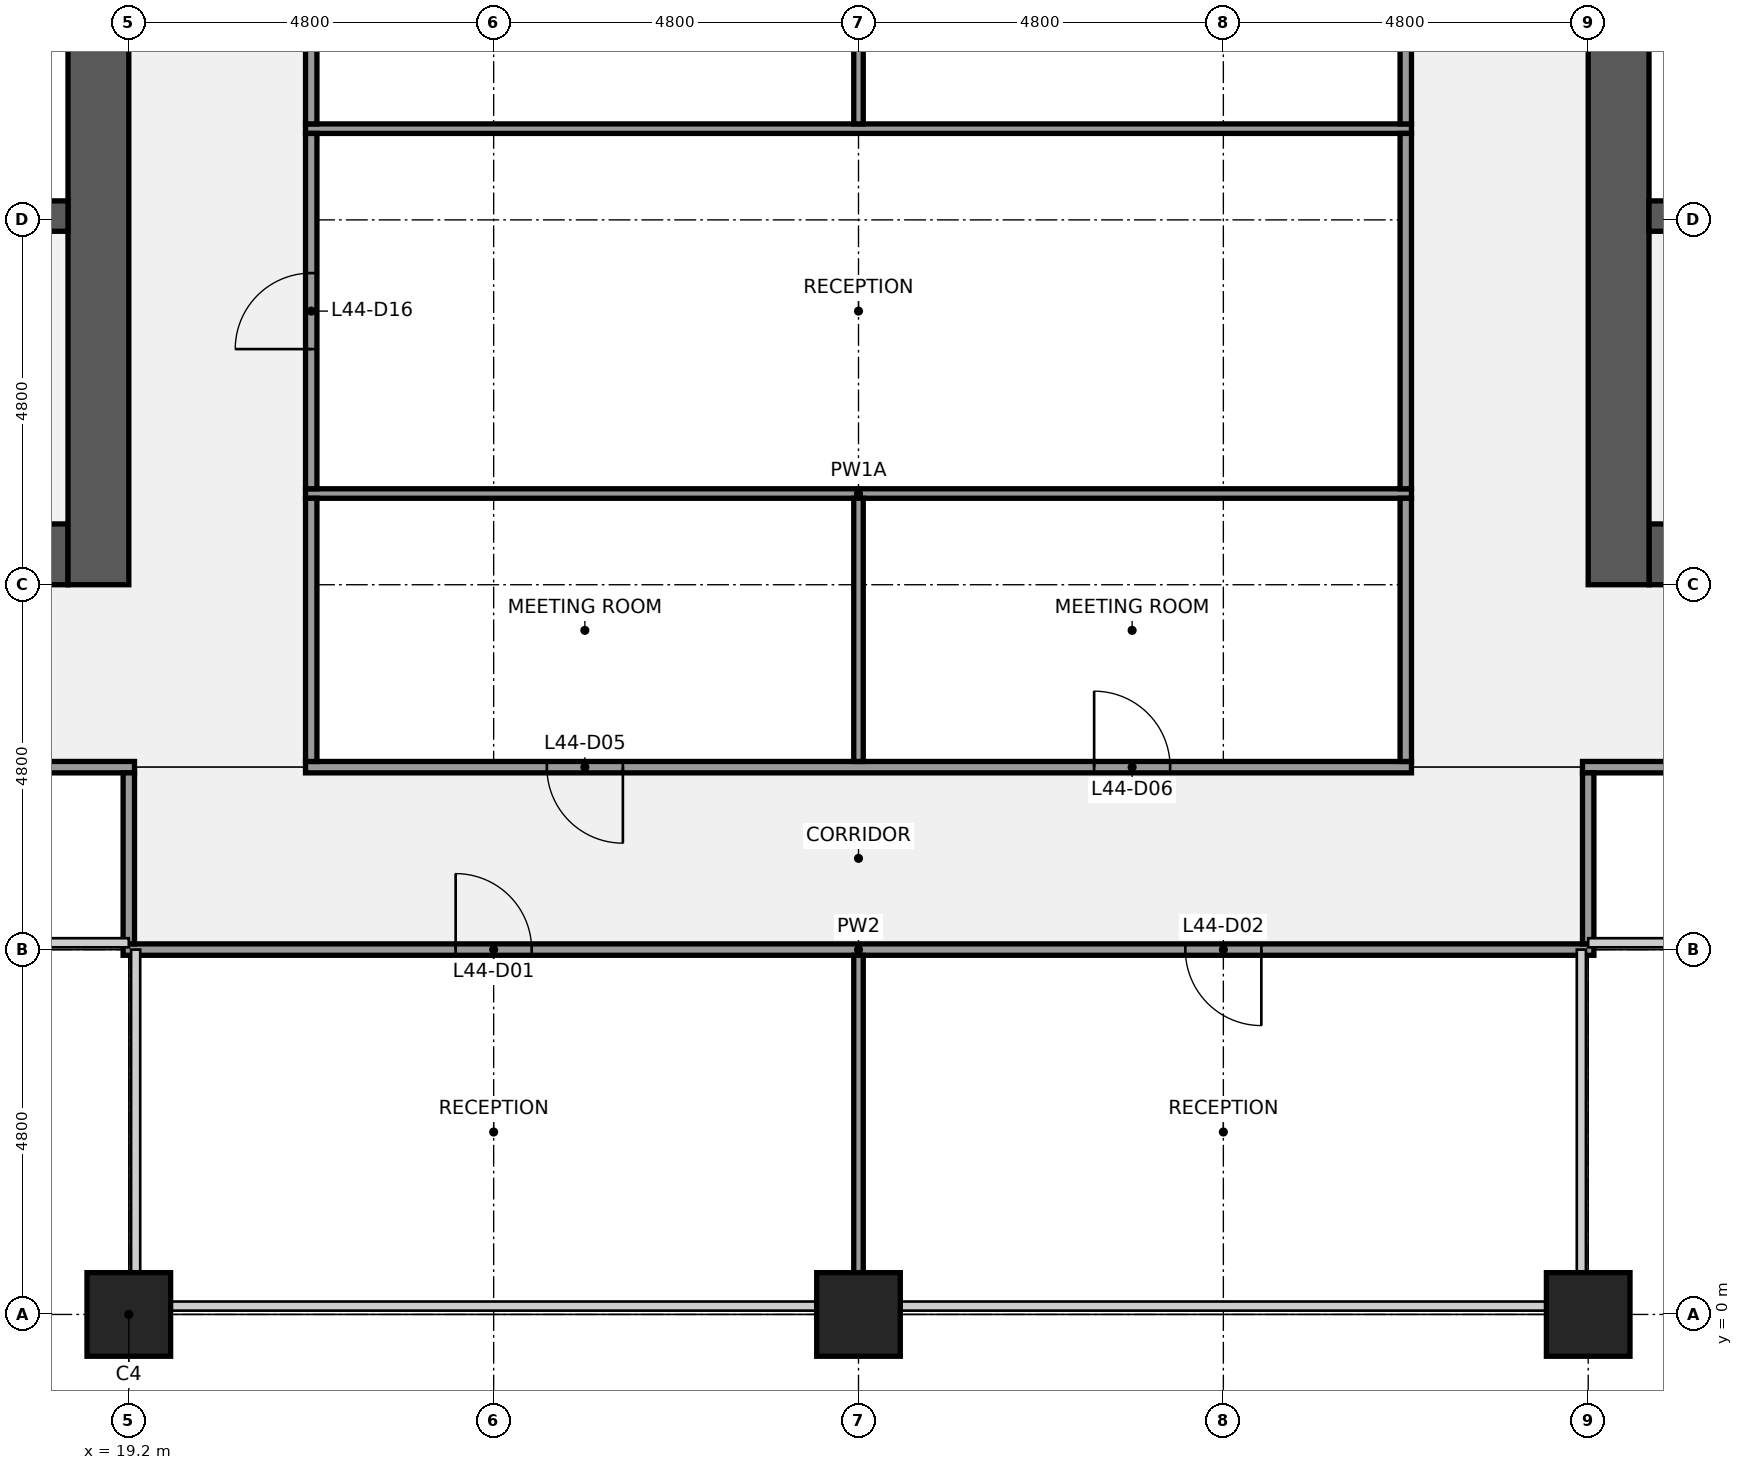
"""IFC4 building model, lengths in metres.
Left out: names, types, materials, properties, quantities, classifications, styles, units other than length and angle.
Written with IfcOpenShell. Run it as: python <this file> out.ifc"""

import sys

from ifc_helpers import new_model, si_unit, direction, frame, frame_2d, origin, origin_2d, place, context, subcontext, project, spatial, rectangle, extrude, element, fill, save


model = new_model("IFC4")
c1 = context("Model", 3, precision=1e-05, world=origin(), true_north=direction((0.0, 1.0)))
c2 = subcontext(c1, "Body", "Model", "MODEL_VIEW")
j1 = project(units=[si_unit("LENGTHUNIT", "METRE"), si_unit("PLANEANGLEUNIT", "RADIAN")], contexts=[c1])
p1 = place(None, origin())
s1 = spatial("IfcSite", under=j1, at=p1, CompositionType="ELEMENT")
p2 = place(p1, origin())
s2 = spatial("IfcBuilding", under=s1, at=p2, CompositionType="ELEMENT")
p3 = place(p2, frame((0.0, 0.0, 205.2)))
s3 = spatial("IfcBuildingStorey", under=s2, at=p3, CompositionType="ELEMENT", Elevation=205.2)
for number, where, z_axis, x_axis in (
    (1, (19.2, 0.0, 0.0), (0.0, 0.0, 1.0), (1.0, 0.0, 0.0)),
    (2, (28.8, 0.0, 0.0), (0.0, 0.0, 1.0), (1.0, 0.0, 0.0)),
    (3, (38.4, 0.0, 0.0), (0.0, 0.0, 1.0), (1.0, 0.0, 0.0)),
):
    element("IfcColumn", number, at=place(p3, frame(where, z_axis=z_axis, x_axis=x_axis)), inside=s3, PredefinedType="COLUMN", context=c2, shape_type="SweptSolid", body=[
        extrude(rectangle(XDim=1.1, YDim=1.1, at=origin_2d()), origin(), (0.0, 0.0, 1.0), 4.0),
    ])
p4 = place(p3, frame((18.4, 10.0, 0.0), z_axis=(0.0, 0.0, 1.0), x_axis=(-1.0, 0.0, 0.0)))
e4 = element("IfcWall", 4, at=p4, inside=s3, PredefinedType="SHEAR", context=c2, shape_type="SweptSolid", body=[
    extrude(rectangle(XDim=8.8, YDim=0.8, at=frame_2d((4.4, 0.0))), origin(), (0.0, 0.0, 1.0), 3.84),
])
p5 = place(p4, frame((1.05, 0.0, 0.0)))
e5 = element("IfcOpeningElement", 5, at=p5, cuts=e4, PredefinedType="OPENING", context=c2, shape_type="SweptSolid", body=[
    extrude(rectangle(XDim=1.1, YDim=2.1, at=frame_2d((0.55, 1.05))), frame((0.0, 0.41, 0.0), z_axis=(0.0, -1.0, 0.0), x_axis=(1.0, 0.0, 0.0)), (0.0, 0.0, 1.0), 0.82),
])
p6 = place(p3, frame((18.8, 38.4, 0.0), z_axis=(0.0, 0.0, 1.0), x_axis=(0.0, -1.0, 0.0)))
e6 = element("IfcWall", 6, at=p6, inside=s3, PredefinedType="SHEAR", context=c2, shape_type="SweptSolid", body=[
    extrude(rectangle(XDim=28.8, YDim=0.8, at=frame_2d((14.4, 0.0))), origin(), (0.0, 0.0, 1.0), 3.84),
])
p7 = place(p6, frame((18.3, 0.0, 0.0)))
e7 = element("IfcOpeningElement", 7, at=p7, cuts=e6, PredefinedType="OPENING", context=c2, shape_type="SweptSolid", body=[
    extrude(rectangle(XDim=1.8, YDim=2.1, at=frame_2d((0.9, 1.05))), frame((0.0, 0.41, 0.0), z_axis=(0.0, -1.0, 0.0), x_axis=(1.0, 0.0, 0.0)), (0.0, 0.0, 1.0), 0.82),
])
p8 = place(p6, frame((8.7, 0.0, 0.0)))
e8 = element("IfcOpeningElement", 8, at=p8, cuts=e6, PredefinedType="OPENING", context=c2, shape_type="SweptSolid", body=[
    extrude(rectangle(XDim=1.8, YDim=2.1, at=frame_2d((0.9, 1.05))), frame((0.0, 0.41, 0.0), z_axis=(0.0, -1.0, 0.0), x_axis=(1.0, 0.0, 0.0)), (0.0, 0.0, 1.0), 0.82),
])
p9 = place(p3, frame((0.8, 14.45, 0.0), z_axis=(0.0, 0.0, 1.0), x_axis=(1.0, 0.0, 0.0)))
e9 = element("IfcWall", 9, at=p9, inside=s3, PredefinedType="SHEAR", context=c2, shape_type="SweptSolid", body=[
    extrude(rectangle(XDim=17.6, YDim=0.4, at=frame_2d((8.8, 0.0))), origin(), (0.0, 0.0, 1.0), 3.84),
])
p10 = place(p3, frame((48.0, 10.0, 0.0), z_axis=(0.0, 0.0, 1.0), x_axis=(-1.0, 0.0, 0.0)))
e10 = element("IfcWall", 10, at=p10, inside=s3, PredefinedType="SHEAR", context=c2, shape_type="SweptSolid", body=[
    extrude(rectangle(XDim=8.8, YDim=0.8, at=frame_2d((4.4, 0.0))), origin(), (0.0, 0.0, 1.0), 3.84),
])
p11 = place(p10, frame((6.65, 0.0, 0.0)))
e11 = element("IfcOpeningElement", 11, at=p11, cuts=e10, PredefinedType="OPENING", context=c2, shape_type="SweptSolid", body=[
    extrude(rectangle(XDim=1.1, YDim=2.1, at=frame_2d((0.55, 1.05))), frame((0.0, 0.41, 0.0), z_axis=(0.0, -1.0, 0.0), x_axis=(1.0, 0.0, 0.0)), (0.0, 0.0, 1.0), 0.82),
])
p12 = place(p3, frame((38.8, 9.6, 0.0), z_axis=(0.0, 0.0, 1.0), x_axis=(0.0, 1.0, 0.0)))
e12 = element("IfcWall", 12, at=p12, inside=s3, PredefinedType="SHEAR", context=c2, shape_type="SweptSolid", body=[
    extrude(rectangle(XDim=28.8, YDim=0.8, at=frame_2d((14.4, 0.0))), origin(), (0.0, 0.0, 1.0), 3.84),
])
p13 = place(p12, frame((8.7, 0.0, 0.0)))
e13 = element("IfcOpeningElement", 13, at=p13, cuts=e12, PredefinedType="OPENING", context=c2, shape_type="SweptSolid", body=[
    extrude(rectangle(XDim=1.8, YDim=2.1, at=frame_2d((0.9, 1.05))), frame((0.0, 0.41, 0.0), z_axis=(0.0, -1.0, 0.0), x_axis=(1.0, 0.0, 0.0)), (0.0, 0.0, 1.0), 0.82),
])
p14 = place(p12, frame((18.3, 0.0, 0.0)))
e14 = element("IfcOpeningElement", 14, at=p14, cuts=e12, PredefinedType="OPENING", context=c2, shape_type="SweptSolid", body=[
    extrude(rectangle(XDim=1.8, YDim=2.1, at=frame_2d((0.9, 1.05))), frame((0.0, 0.41, 0.0), z_axis=(0.0, -1.0, 0.0), x_axis=(1.0, 0.0, 0.0)), (0.0, 0.0, 1.0), 0.82),
])
p15 = place(p3, frame((39.2, 14.45, 0.0), z_axis=(0.0, 0.0, 1.0), x_axis=(1.0, 0.0, 0.0)))
e15 = element("IfcWall", 15, at=p15, inside=s3, PredefinedType="SHEAR", context=c2, shape_type="SweptSolid", body=[
    extrude(rectangle(XDim=17.6, YDim=0.4, at=frame_2d((8.8, 0.0))), origin(), (0.0, 0.0, 1.0), 3.84),
])
p16 = place(p3, frame((19.125, 4.8, 0.0), z_axis=(0.0, 0.0, 1.0), x_axis=(1.0, 0.0, 0.0)))
e16 = element("IfcWall", 16, at=p16, inside=s3, PredefinedType="PARTITIONING", context=c2, shape_type="SweptSolid", body=[
    extrude(rectangle(XDim=19.35, YDim=0.15, at=frame_2d((9.675, 0.0))), origin(), (0.0, 0.0, 1.0), 2.849),
])
p17 = place(p16, frame((4.375, 0.0, 0.0)))
e17 = element("IfcOpeningElement", 17, at=p17, cuts=e16, PredefinedType="OPENING", context=c2, shape_type="SweptSolid", body=[
    extrude(rectangle(XDim=1.0, YDim=2.1, at=frame_2d((0.5, 1.05))), frame((0.0, 0.085, 0.0), z_axis=(0.0, -1.0, 0.0), x_axis=(1.0, 0.0, 0.0)), (0.0, 0.0, 1.0), 0.17),
])
p18 = place(p16, frame((13.975, 0.0, 0.0)))
e18 = element("IfcOpeningElement", 18, at=p18, cuts=e16, PredefinedType="OPENING", context=c2, shape_type="SweptSolid", body=[
    extrude(rectangle(XDim=1.0, YDim=2.1, at=frame_2d((0.5, 1.05))), frame((0.0, 0.085, 0.0), z_axis=(0.0, -1.0, 0.0), x_axis=(1.0, 0.0, 0.0)), (0.0, 0.0, 1.0), 0.17),
])
p19 = place(p3, frame((9.7, 7.2, 0.0), z_axis=(0.0, 0.0, 1.0), x_axis=(1.0, 0.0, 0.0)))
e19 = element("IfcWall", 19, at=p19, inside=s3, PredefinedType="PARTITIONING", context=c2, shape_type="SweptSolid", body=[
    extrude(rectangle(XDim=9.575, YDim=0.15, at=frame_2d((4.788, 0.0))), origin(), (0.0, 0.0, 1.0), 2.849),
])
p20 = place(p19, frame((1.85, 0.0, 0.0)))
e20 = element("IfcOpeningElement", 20, at=p20, cuts=e19, PredefinedType="OPENING", context=c2, shape_type="SweptSolid", body=[
    extrude(rectangle(XDim=1.0, YDim=2.1, at=frame_2d((0.5, 1.05))), frame((0.0, 0.085, 0.0), z_axis=(0.0, -1.0, 0.0), x_axis=(1.0, 0.0, 0.0)), (0.0, 0.0, 1.0), 0.17),
])
p21 = place(p19, frame((6.6, 0.0, 0.0)))
e21 = element("IfcOpeningElement", 21, at=p21, cuts=e19, PredefinedType="OPENING", context=c2, shape_type="SweptSolid", body=[
    extrude(rectangle(XDim=1.0, YDim=2.1, at=frame_2d((0.5, 1.05))), frame((0.0, 0.085, 0.0), z_axis=(0.0, -1.0, 0.0), x_axis=(1.0, 0.0, 0.0)), (0.0, 0.0, 1.0), 0.17),
])
p22 = place(p3, frame((21.525, 7.2, 0.0), z_axis=(0.0, 0.0, 1.0), x_axis=(1.0, 0.0, 0.0)))
e22 = element("IfcWall", 22, at=p22, inside=s3, PredefinedType="PARTITIONING", context=c2, shape_type="SweptSolid", body=[
    extrude(rectangle(XDim=14.55, YDim=0.15, at=frame_2d((7.275, 0.0))), origin(), (0.0, 0.0, 1.0), 2.849),
])
p23 = place(p22, frame((3.175, 0.0, 0.0)))
e23 = element("IfcOpeningElement", 23, at=p23, cuts=e22, PredefinedType="OPENING", context=c2, shape_type="SweptSolid", body=[
    extrude(rectangle(XDim=1.0, YDim=2.1, at=frame_2d((0.5, 1.05))), frame((0.0, 0.085, 0.0), z_axis=(0.0, -1.0, 0.0), x_axis=(1.0, 0.0, 0.0)), (0.0, 0.0, 1.0), 0.17),
])
p24 = place(p22, frame((10.375, 0.0, 0.0)))
e24 = element("IfcOpeningElement", 24, at=p24, cuts=e22, PredefinedType="OPENING", context=c2, shape_type="SweptSolid", body=[
    extrude(rectangle(XDim=1.0, YDim=2.1, at=frame_2d((0.5, 1.05))), frame((0.0, 0.085, 0.0), z_axis=(0.0, -1.0, 0.0), x_axis=(1.0, 0.0, 0.0)), (0.0, 0.0, 1.0), 0.17),
])
p25 = place(p3, frame((38.325, 7.2, 0.0), z_axis=(0.0, 0.0, 1.0), x_axis=(1.0, 0.0, 0.0)))
e25 = element("IfcWall", 25, at=p25, inside=s3, PredefinedType="PARTITIONING", context=c2, shape_type="SweptSolid", body=[
    extrude(rectangle(XDim=9.575, YDim=0.15, at=frame_2d((4.788, 0.0))), origin(), (0.0, 0.0, 1.0), 2.849),
])
p26 = place(p25, frame((4.325, 0.0, 0.0)))
e26 = element("IfcOpeningElement", 26, at=p26, cuts=e25, PredefinedType="OPENING", context=c2, shape_type="SweptSolid", body=[
    extrude(rectangle(XDim=1.0, YDim=2.1, at=frame_2d((0.5, 1.05))), frame((0.0, 0.085, 0.0), z_axis=(0.0, -1.0, 0.0), x_axis=(1.0, 0.0, 0.0)), (0.0, 0.0, 1.0), 0.17),
])
for number, where, z_axis, x_axis in (
    (27, (21.525, 10.8, 0.0), (0.0, 0.0, 1.0), (1.0, 0.0, 0.0)),
    (28, (21.525, 15.6, 0.0), (0.0, 0.0, 1.0), (1.0, 0.0, 0.0)),
):
    element("IfcWall", number, at=place(p3, frame(where, z_axis=z_axis, x_axis=x_axis)), inside=s3, PredefinedType="PARTITIONING", context=c2, shape_type="SweptSolid", body=[
        extrude(rectangle(XDim=14.55, YDim=0.125, at=frame_2d((7.275, 0.0))), origin(), (0.0, 0.0, 1.0), 2.849),
    ])
p27 = place(p3, frame((19.2, 4.875, 0.0), z_axis=(0.0, 0.0, 1.0), x_axis=(0.0, 1.0, 0.0)))
e29 = element("IfcWall", 29, at=p27, inside=s3, PredefinedType="PARTITIONING", context=c2, shape_type="SweptSolid", body=[
    extrude(rectangle(XDim=2.25, YDim=0.15, at=frame_2d((1.125, 0.0))), origin(), (0.0, 0.0, 1.0), 2.849),
])
p28 = place(p3, frame((21.6, 7.275, 0.0), z_axis=(0.0, 0.0, 1.0), x_axis=(0.0, 1.0, 0.0)))
e30 = element("IfcWall", 30, at=p28, inside=s3, PredefinedType="PARTITIONING", context=c2, shape_type="SweptSolid", body=[
    extrude(rectangle(XDim=3.463, YDim=0.15, at=frame_2d((1.731, 0.0))), origin(), (0.0, 0.0, 1.0), 2.849),
])
p29 = place(p3, frame((21.6, 10.863, 0.0), z_axis=(0.0, 0.0, 1.0), x_axis=(0.0, 1.0, 0.0)))
e31 = element("IfcWall", 31, at=p29, inside=s3, PredefinedType="PARTITIONING", context=c2, shape_type="SweptSolid", body=[
    extrude(rectangle(XDim=4.675, YDim=0.15, at=frame_2d((2.337, 0.0))), origin(), (0.0, 0.0, 1.0), 2.849),
])
p30 = place(p29, frame((1.837, 0.0, 0.0)))
e32 = element("IfcOpeningElement", 32, at=p30, cuts=e31, PredefinedType="OPENING", context=c2, shape_type="SweptSolid", body=[
    extrude(rectangle(XDim=1.0, YDim=2.1, at=frame_2d((0.5, 1.05))), frame((0.0, 0.085, 0.0), z_axis=(0.0, -1.0, 0.0), x_axis=(1.0, 0.0, 0.0)), (0.0, 0.0, 1.0), 0.17),
])
p31 = place(p3, frame((21.6, 15.663, 0.0), z_axis=(0.0, 0.0, 1.0), x_axis=(0.0, 1.0, 0.0)))
e33 = element("IfcWall", 33, at=p31, inside=s3, PredefinedType="PARTITIONING", context=c2, shape_type="SweptSolid", body=[
    extrude(rectangle(XDim=9.475, YDim=0.15, at=frame_2d((4.737, 0.0))), origin(), (0.0, 0.0, 1.0), 2.849),
])
p32 = place(p31, frame((4.238, 0.0, 0.0)))
e34 = element("IfcOpeningElement", 34, at=p32, cuts=e33, PredefinedType="OPENING", context=c2, shape_type="SweptSolid", body=[
    extrude(rectangle(XDim=1.0, YDim=2.1, at=frame_2d((0.5, 1.05))), frame((0.0, 0.085, 0.0), z_axis=(0.0, -1.0, 0.0), x_axis=(1.0, 0.0, 0.0)), (0.0, 0.0, 1.0), 0.17),
])
p33 = place(p3, frame((28.8, 0.55, 0.0), z_axis=(0.0, 0.0, 1.0), x_axis=(0.0, 1.0, 0.0)))
e35 = element("IfcWall", 35, at=p33, inside=s3, PredefinedType="PARTITIONING", context=c2, shape_type="SweptSolid", body=[
    extrude(rectangle(XDim=4.175, YDim=0.125, at=frame_2d((2.087, 0.0))), origin(), (0.0, 0.0, 1.0), 2.849),
])
p34 = place(p3, frame((28.8, 7.275, 0.0), z_axis=(0.0, 0.0, 1.0), x_axis=(0.0, 1.0, 0.0)))
e36 = element("IfcWall", 36, at=p34, inside=s3, PredefinedType="PARTITIONING", context=c2, shape_type="SweptSolid", body=[
    extrude(rectangle(XDim=3.463, YDim=0.125, at=frame_2d((1.731, 0.0))), origin(), (0.0, 0.0, 1.0), 2.849),
])
p35 = place(p3, frame((28.8, 15.663, 0.0), z_axis=(0.0, 0.0, 1.0), x_axis=(0.0, 1.0, 0.0)))
e37 = element("IfcWall", 37, at=p35, inside=s3, PredefinedType="PARTITIONING", context=c2, shape_type="SweptSolid", body=[
    extrude(rectangle(XDim=9.475, YDim=0.125, at=frame_2d((4.737, 0.0))), origin(), (0.0, 0.0, 1.0), 2.849),
])
p36 = place(p3, frame((36.0, 7.275, 0.0), z_axis=(0.0, 0.0, 1.0), x_axis=(0.0, 1.0, 0.0)))
e38 = element("IfcWall", 38, at=p36, inside=s3, PredefinedType="PARTITIONING", context=c2, shape_type="SweptSolid", body=[
    extrude(rectangle(XDim=3.463, YDim=0.15, at=frame_2d((1.731, 0.0))), origin(), (0.0, 0.0, 1.0), 2.849),
])
p37 = place(p3, frame((36.0, 10.863, 0.0), z_axis=(0.0, 0.0, 1.0), x_axis=(0.0, 1.0, 0.0)))
e39 = element("IfcWall", 39, at=p37, inside=s3, PredefinedType="PARTITIONING", context=c2, shape_type="SweptSolid", body=[
    extrude(rectangle(XDim=4.675, YDim=0.15, at=frame_2d((2.337, 0.0))), origin(), (0.0, 0.0, 1.0), 2.849),
])
p38 = place(p3, frame((36.0, 15.663, 0.0), z_axis=(0.0, 0.0, 1.0), x_axis=(0.0, 1.0, 0.0)))
e40 = element("IfcWall", 40, at=p38, inside=s3, PredefinedType="PARTITIONING", context=c2, shape_type="SweptSolid", body=[
    extrude(rectangle(XDim=9.475, YDim=0.15, at=frame_2d((4.737, 0.0))), origin(), (0.0, 0.0, 1.0), 2.849),
])
p39 = place(p38, frame((4.238, 0.0, 0.0)))
e41 = element("IfcOpeningElement", 41, at=p39, cuts=e40, PredefinedType="OPENING", context=c2, shape_type="SweptSolid", body=[
    extrude(rectangle(XDim=1.0, YDim=2.1, at=frame_2d((0.5, 1.05))), frame((0.0, 0.085, 0.0), z_axis=(0.0, -1.0, 0.0), x_axis=(1.0, 0.0, 0.0)), (0.0, 0.0, 1.0), 0.17),
])
p40 = place(p3, frame((38.4, 4.875, 0.0), z_axis=(0.0, 0.0, 1.0), x_axis=(0.0, 1.0, 0.0)))
e42 = element("IfcWall", 42, at=p40, inside=s3, PredefinedType="PARTITIONING", context=c2, shape_type="SweptSolid", body=[
    extrude(rectangle(XDim=2.25, YDim=0.15, at=frame_2d((1.125, 0.0))), origin(), (0.0, 0.0, 1.0), 2.849),
])
for number, where, z_axis, x_axis in (
    (43, (19.2, -1.025, 0.0), (0.0, 0.0, 1.0), (1.0, 0.0, 0.0)),
    (44, (38.4, -1.025, 0.0), (0.0, 0.0, 1.0), (1.0, 0.0, 0.0)),
):
    element("IfcColumn", number, at=place(p3, frame(where, z_axis=z_axis, x_axis=x_axis)), inside=s3, PredefinedType="PILASTER", context=c2, shape_type="SweptSolid", body=[
        extrude(rectangle(XDim=2.4, YDim=0.95, at=origin_2d()), origin(), (0.0, 0.0, 1.0), 4.0),
    ])
p41 = place(p17, origin())
e45 = element("IfcDoor", 45, at=p41, inside=s3, OperationType="SINGLE_SWING_LEFT", PredefinedType="DOOR", context=c2, shape_type="SweptSolid", body=[
    extrude(rectangle(XDim=1.0, YDim=2.1, at=frame_2d((0.5, 1.05))), frame((0.0, 0.025, 0.0), z_axis=(0.0, -1.0, 0.0), x_axis=(1.0, 0.0, 0.0)), (0.0, 0.0, 1.0), 0.05),
])
fill(e17, e45)
p42 = place(p18, origin())
e46 = element("IfcDoor", 46, at=p42, inside=s3, OperationType="SINGLE_SWING_RIGHT", PredefinedType="DOOR", context=c2, shape_type="SweptSolid", body=[
    extrude(rectangle(XDim=1.0, YDim=2.1, at=frame_2d((0.5, 1.05))), frame((0.0, 0.025, 0.0), z_axis=(0.0, -1.0, 0.0), x_axis=(1.0, 0.0, 0.0)), (0.0, 0.0, 1.0), 0.05),
])
fill(e18, e46)
p43 = place(p23, origin())
e47 = element("IfcDoor", 47, at=p43, inside=s3, OperationType="SINGLE_SWING_RIGHT", PredefinedType="DOOR", context=c2, shape_type="SweptSolid", body=[
    extrude(rectangle(XDim=1.0, YDim=2.1, at=frame_2d((0.5, 1.05))), frame((0.0, 0.025, 0.0), z_axis=(0.0, -1.0, 0.0), x_axis=(1.0, 0.0, 0.0)), (0.0, 0.0, 1.0), 0.05),
])
fill(e23, e47)
p44 = place(p24, origin())
e48 = element("IfcDoor", 48, at=p44, inside=s3, OperationType="SINGLE_SWING_LEFT", PredefinedType="DOOR", context=c2, shape_type="SweptSolid", body=[
    extrude(rectangle(XDim=1.0, YDim=2.1, at=frame_2d((0.5, 1.05))), frame((0.0, 0.025, 0.0), z_axis=(0.0, -1.0, 0.0), x_axis=(1.0, 0.0, 0.0)), (0.0, 0.0, 1.0), 0.05),
])
fill(e24, e48)
p45 = place(p30, origin())
e49 = element("IfcDoor", 49, at=p45, inside=s3, OperationType="SINGLE_SWING_LEFT", PredefinedType="DOOR", context=c2, shape_type="SweptSolid", body=[
    extrude(rectangle(XDim=1.0, YDim=2.1, at=frame_2d((0.5, 1.05))), frame((0.0, 0.025, 0.0), z_axis=(0.0, -1.0, 0.0), x_axis=(1.0, 0.0, 0.0)), (0.0, 0.0, 1.0), 0.05),
])
fill(e32, e49)
save(model, sys.argv[1])
